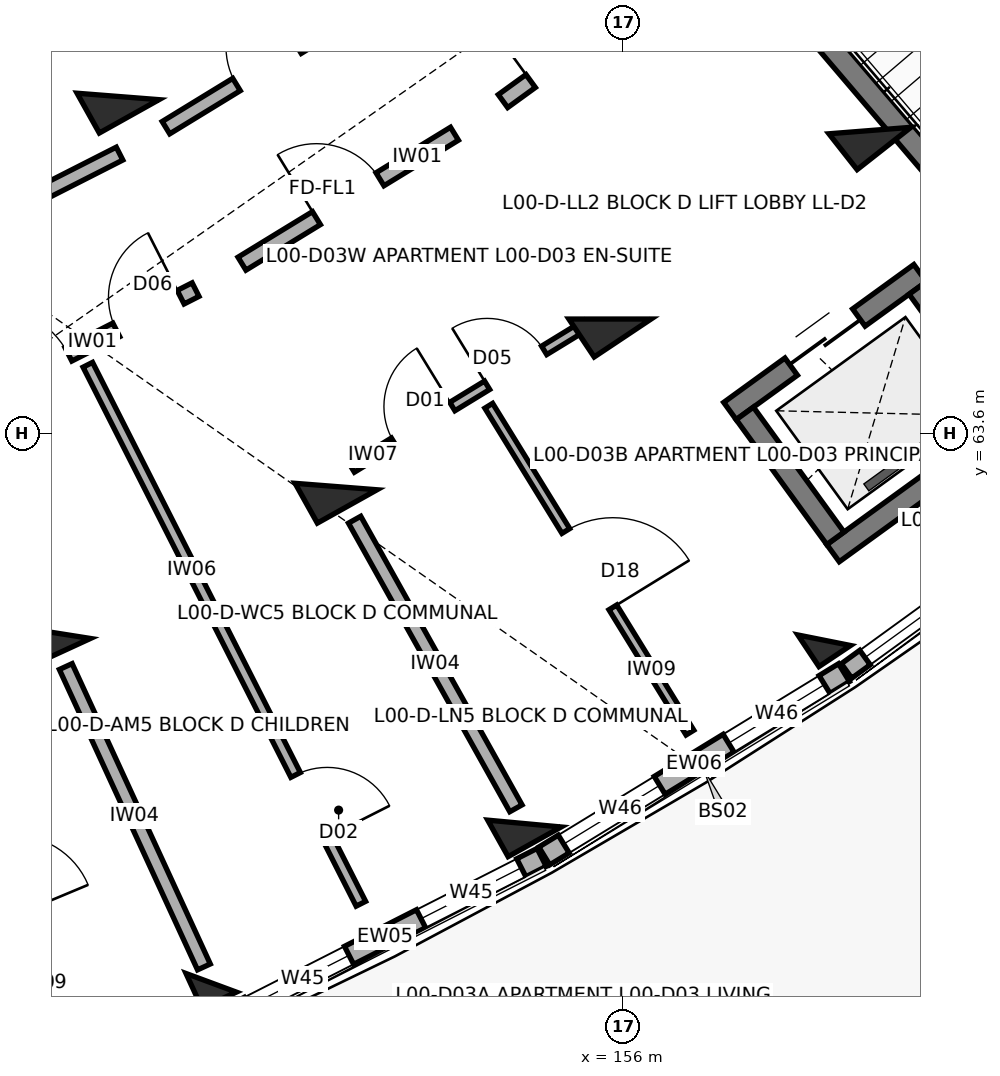
"""IFC4 building model, lengths in metres.
Left out: names, types, materials, properties, quantities, classifications, styles, units other than length and angle.
Written with IfcOpenShell. Run it as: python <this file> out.ifc"""

import sys

from ifc_helpers import new_model, si_unit, direction, frame, frame_2d, origin, origin_2d, place, context, subcontext, project, spatial, rectangle, extrude, element, fill, save


model = new_model("IFC4")
c1 = context("Model", 3, precision=1e-05, world=origin(), true_north=direction((0.0, 1.0)))
c2 = subcontext(c1, "Body", "Model", "MODEL_VIEW")
j1 = project(units=[si_unit("LENGTHUNIT", "METRE"), si_unit("PLANEANGLEUNIT", "RADIAN")], contexts=[c1])
p1 = place(None, origin())
s1 = spatial("IfcSite", under=j1, at=p1, CompositionType="ELEMENT")
p2 = place(p1, origin())
s2 = spatial("IfcBuilding", under=s1, at=p2, CompositionType="ELEMENT")
p3 = place(p2, origin())
s3 = spatial("IfcBuildingStorey", under=s2, at=p3, CompositionType="ELEMENT", Elevation=0.0)
p4 = place(p3, frame((148.461, 60.982, 0.0), z_axis=(0.0, 0.0, 1.0), x_axis=(0.417867073801, -0.908508177527, 0.0)))
e1 = element("IfcColumn", 1, at=p4, inside=s3, PredefinedType="COLUMN", context=c2, shape_type="SweptSolid", body=[
    extrude(rectangle(XDim=0.6, YDim=0.9, at=origin_2d()), origin(), (0.0, 0.0, 1.0), 4.5),
])
p5 = place(p3, frame((150.584, 56.367, 0.0), z_axis=(0.0, 0.0, 1.0), x_axis=(0.417867073801, -0.908508177527, 0.0)))
e2 = element("IfcColumn", 2, at=p5, inside=s3, PredefinedType="COLUMN", context=c2, shape_type="SweptSolid", body=[
    extrude(rectangle(XDim=0.5, YDim=0.5, at=origin_2d()), origin(), (0.0, 0.0, 1.0), 4.5),
])
for number, where, z_axis, x_axis in (
    (3, (149.358, 68.03, 0.0), (0.0, 0.0, 1.0), (0.488, -0.873, 0.0)),
    (4, (152.227, 62.897, 0.0), (0.0, 0.0, 1.0), (0.488, -0.873, 0.0)),
):
    element("IfcColumn", number, at=place(p3, frame(where, z_axis=z_axis, x_axis=x_axis)), inside=s3, PredefinedType="COLUMN", context=c2, shape_type="SweptSolid", body=[
        extrude(rectangle(XDim=0.6, YDim=0.9, at=origin_2d()), origin(), (0.0, 0.0, 1.0), 4.5),
    ])
p6 = place(p3, frame((154.705, 58.462, 0.0), z_axis=(0.0, 0.0, 1.0), x_axis=(0.487859659139, -0.87292207727, 0.0)))
e5 = element("IfcColumn", 5, at=p6, inside=s3, PredefinedType="COLUMN", context=c2, shape_type="SweptSolid", body=[
    extrude(rectangle(XDim=0.55, YDim=0.8, at=origin_2d()), origin(), (0.0, 0.0, 1.0), 4.5),
])
p7 = place(p3, frame((155.831, 65.101, 0.0), z_axis=(0.0, 0.0, 1.0), x_axis=(0.554844427448, -0.83195412213, 0.0)))
e6 = element("IfcColumn", 6, at=p7, inside=s3, PredefinedType="COLUMN", context=c2, shape_type="SweptSolid", body=[
    extrude(rectangle(XDim=0.6, YDim=0.9, at=origin_2d()), origin(), (0.0, 0.0, 1.0), 4.5),
])
p8 = place(p3, frame((158.649, 60.875, 0.0), z_axis=(0.0, 0.0, 1.0), x_axis=(0.554844427448, -0.83195412213, 0.0)))
e7 = element("IfcColumn", 7, at=p8, inside=s3, PredefinedType="COLUMN", context=c2, shape_type="SweptSolid", body=[
    extrude(rectangle(XDim=0.5, YDim=0.5, at=origin_2d()), origin(), (0.0, 0.0, 1.0), 4.5),
])
p9 = place(p3, frame((159.25, 67.581, 0.0), z_axis=(0.0, 0.0, 1.0), x_axis=(0.618408395358, -0.785856893175, 0.0)))
e8 = element("IfcColumn", 8, at=p9, inside=s3, PredefinedType="COLUMN", context=c2, shape_type="SweptSolid", body=[
    extrude(rectangle(XDim=0.6, YDim=0.9, at=origin_2d()), origin(), (0.0, 0.0, 1.0), 4.5),
])
p10 = place(p3, frame((150.811, 55.922, 0.0), z_axis=(0.0, 0.0, 1.0), x_axis=(0.891407190547, 0.453203288428, 0.0)))
e9 = element("IfcWall", 9, at=p10, inside=s3, PredefinedType="SOLIDWALL", context=c2, shape_type="SweptSolid", body=[
    extrude(rectangle(XDim=4.623, YDim=0.265, at=frame_2d((2.311, 0.0))), origin(), (0.0, 0.0, 1.0), 3.45),
])
p11 = place(p10, frame((0.3, 0.0, 0.3)))
e10 = element("IfcOpeningElement", 10, at=p11, cuts=e9, PredefinedType="OPENING", context=c2, shape_type="SweptSolid", body=[
    extrude(rectangle(XDim=1.48, YDim=1.16, at=frame_2d((0.74, 0.58))), frame((0.0, 0.142, 0.0), z_axis=(0.0, -1.0, 0.0), x_axis=(1.0, 0.0, 0.0)), (0.0, 0.0, 1.0), 0.285),
])
p12 = place(p10, frame((2.843, 0.0, 0.3)))
e11 = element("IfcOpeningElement", 11, at=p12, cuts=e9, PredefinedType="OPENING", context=c2, shape_type="SweptSolid", body=[
    extrude(rectangle(XDim=1.48, YDim=1.16, at=frame_2d((0.74, 0.58))), frame((0.0, 0.142, 0.0), z_axis=(0.0, -1.0, 0.0), x_axis=(1.0, 0.0, 0.0)), (0.0, 0.0, 1.0), 0.285),
])
p13 = place(p3, frame((154.966, 58.036, 0.0), z_axis=(0.0, 0.0, 1.0), x_axis=(0.853100316352, 0.521746921639, 0.0)))
e12 = element("IfcWall", 12, at=p13, inside=s3, PredefinedType="SOLIDWALL", context=c2, shape_type="SweptSolid", body=[
    extrude(rectangle(XDim=4.623, YDim=0.275, at=frame_2d((2.311, 0.0))), origin(), (0.0, 0.0, 1.0), 3.45),
])
p14 = place(p13, frame((0.3, 0.0, 0.3)))
e13 = element("IfcOpeningElement", 13, at=p14, cuts=e12, PredefinedType="OPENING", context=c2, shape_type="SweptSolid", body=[
    extrude(rectangle(XDim=1.48, YDim=1.28, at=frame_2d((0.74, 0.64))), frame((0.0, 0.147, 0.0), z_axis=(0.0, -1.0, 0.0), x_axis=(1.0, 0.0, 0.0)), (0.0, 0.0, 1.0), 0.295),
])
p15 = place(p13, frame((2.843, 0.0, 0.3)))
e14 = element("IfcOpeningElement", 14, at=p15, cuts=e12, PredefinedType="OPENING", context=c2, shape_type="SweptSolid", body=[
    extrude(rectangle(XDim=1.48, YDim=1.28, at=frame_2d((0.74, 0.64))), frame((0.0, 0.147, 0.0), z_axis=(0.0, -1.0, 0.0), x_axis=(1.0, 0.0, 0.0)), (0.0, 0.0, 1.0), 0.295),
])
p16 = place(p3, frame((158.943, 60.47, 0.0), z_axis=(0.0, 0.0, 1.0), x_axis=(0.809511918444, 0.58710344395, 0.0)))
e15 = element("IfcWall", 15, at=p16, inside=s3, PredefinedType="SOLIDWALL", context=c2, shape_type="SweptSolid", body=[
    extrude(rectangle(XDim=4.623, YDim=0.235, at=frame_2d((2.311, 0.0))), origin(), (0.0, 0.0, 1.0), 3.45),
])
p17 = place(p16, frame((0.3, 0.0, 0.3)))
e16 = element("IfcOpeningElement", 16, at=p17, cuts=e15, PredefinedType="OPENING", context=c2, shape_type="SweptSolid", body=[
    extrude(rectangle(XDim=1.48, YDim=1.42, at=frame_2d((0.74, 0.71))), frame((0.0, 0.127, 0.0), z_axis=(0.0, -1.0, 0.0), x_axis=(1.0, 0.0, 0.0)), (0.0, 0.0, 1.0), 0.255),
])
p18 = place(p16, frame((2.843, 0.0, 0.3)))
e17 = element("IfcOpeningElement", 17, at=p18, cuts=e15, PredefinedType="OPENING", context=c2, shape_type="SweptSolid", body=[
    extrude(rectangle(XDim=1.48, YDim=1.42, at=frame_2d((0.74, 0.71))), frame((0.0, 0.127, 0.0), z_axis=(0.0, -1.0, 0.0), x_axis=(1.0, 0.0, 0.0)), (0.0, 0.0, 1.0), 0.255),
])
p19 = place(p3, frame((157.583, 70.041, 0.0), z_axis=(0.0, 0.0, 1.0), x_axis=(0.648762810187, -0.760990680704, 0.0)))
e18 = element("IfcWall", 18, at=p19, inside=s3, PredefinedType="SHEAR", context=c2, shape_type="SweptSolid", body=[
    extrude(rectangle(XDim=7.69, YDim=0.3, at=frame_2d((3.845, 0.0))), origin(), (0.0, 0.0, 1.0), 4.5),
])
p20 = place(p3, frame((157.409, 63.89, 0.0), z_axis=(0.0, 0.0, 1.0), x_axis=(0.809510936031, 0.587104798521, 0.0)))
e19 = element("IfcWall", 19, at=p20, inside=s3, PredefinedType="SHEAR", context=c2, shape_type="SweptSolid", body=[
    extrude(rectangle(XDim=3.09, YDim=0.28, at=frame_2d((1.545, 0.0))), origin(), (0.0, 0.0, 1.0), 4.5),
])
p21 = place(p20, frame((0.995, 0.0, 0.0)))
e20 = element("IfcOpeningElement", 20, at=p21, cuts=e19, PredefinedType="OPENING", context=c2, shape_type="SweptSolid", body=[
    extrude(rectangle(XDim=1.1, YDim=2.15, at=frame_2d((0.55, 1.075))), frame((0.0, 0.15, 0.0), z_axis=(0.0, -1.0, 0.0), x_axis=(1.0, 0.0, 0.0)), (0.0, 0.0, 1.0), 0.3),
])
p22 = place(p3, frame((158.765, 62.021, 0.0), z_axis=(0.0, 0.0, 1.0), x_axis=(0.809548485838, 0.587053020669, 0.0)))
e21 = element("IfcWall", 21, at=p22, inside=s3, PredefinedType="SHEAR", context=c2, shape_type="SweptSolid", body=[
    extrude(rectangle(XDim=3.09, YDim=0.28, at=frame_2d((1.545, 0.0))), origin(), (0.0, 0.0, 1.0), 4.5),
])
p23 = place(p3, frame((157.604, 63.859, 0.0), z_axis=(0.0, 0.0, 1.0), x_axis=(0.587127188998, -0.809494696671, 0.0)))
e22 = element("IfcWall", 22, at=p23, inside=s3, PredefinedType="SHEAR", context=c2, shape_type="SweptSolid", body=[
    extrude(rectangle(XDim=2.03, YDim=0.28, at=frame_2d((1.015, 0.0))), origin(), (0.0, 0.0, 1.0), 4.5),
])
p24 = place(p3, frame((159.879, 65.509, 0.0), z_axis=(0.0, 0.0, 1.0), x_axis=(0.58704837408, -0.809551855344, 0.0)))
e23 = element("IfcWall", 23, at=p24, inside=s3, PredefinedType="SHEAR", context=c2, shape_type="SweptSolid", body=[
    extrude(rectangle(XDim=2.03, YDim=0.28, at=frame_2d((1.015, 0.0))), origin(), (0.0, 0.0, 1.0), 4.5),
])
p25 = place(p3, frame((146.837, 59.996, 0.0), z_axis=(0.0, 0.0, 1.0), x_axis=(0.385846225752, -0.922563108992, 0.0)))
e24 = element("IfcWall", 24, at=p25, inside=s3, PredefinedType="PARTITIONING", context=c2, shape_type="SweptSolid", body=[
    extrude(rectangle(XDim=4.9, YDim=0.12, at=frame_2d((2.45, 0.0))), origin(), (0.0, 0.0, 1.0), 3.34),
])
p26 = place(p25, frame((1.92, 0.0, 0.0)))
e25 = element("IfcOpeningElement", 25, at=p26, cuts=e24, PredefinedType="OPENING", context=c2, shape_type="SweptSolid", body=[
    extrude(rectangle(XDim=1.06, YDim=2.1, at=frame_2d((0.53, 1.05))), frame((0.0, 0.07, 0.0), z_axis=(0.0, -1.0, 0.0), x_axis=(1.0, 0.0, 0.0)), (0.0, 0.0, 1.0), 0.14),
])
p27 = place(p3, frame((147.457, 64.003, 0.0), z_axis=(0.0, 0.0, 1.0), x_axis=(0.891412167565, 0.45319349898, 0.0)))
e26 = element("IfcWall", 26, at=p27, inside=s3, PredefinedType="SOLIDWALL", context=c2, shape_type="SweptSolid", body=[
    extrude(rectangle(XDim=3.277, YDim=0.2, at=frame_2d((1.639, 0.0))), origin(), (0.0, 0.0, 1.0), 3.34),
])
p28 = place(p27, frame((0.28, 0.0, 0.0)))
e27 = element("IfcOpeningElement", 27, at=p28, cuts=e26, PredefinedType="OPENING", context=c2, shape_type="SweptSolid", body=[
    extrude(rectangle(XDim=1.12, YDim=2.15, at=frame_2d((0.56, 1.075))), frame((0.0, 0.11, 0.0), z_axis=(0.0, -1.0, 0.0), x_axis=(1.0, 0.0, 0.0)), (0.0, 0.0, 1.0), 0.22),
])
p29 = place(p27, frame((2.107, 0.0, 0.0)))
e28 = element("IfcOpeningElement", 28, at=p29, cuts=e26, PredefinedType="OPENING", context=c2, shape_type="SweptSolid", body=[
    extrude(rectangle(XDim=0.95, YDim=2.1, at=frame_2d((0.475, 1.05))), frame((0.0, 0.11, 0.0), z_axis=(0.0, -1.0, 0.0), x_axis=(1.0, 0.0, 0.0)), (0.0, 0.0, 1.0), 0.22),
])
p30 = place(p3, frame((146.6, 65.865, 0.0), z_axis=(0.0, 0.0, 1.0), x_axis=(0.891414101388, 0.453189695212, 0.0)))
e29 = element("IfcWall", 29, at=p30, inside=s3, PredefinedType="SOLIDWALL", context=c2, shape_type="SweptSolid", body=[
    extrude(rectangle(XDim=3.116, YDim=0.19, at=frame_2d((1.558, 0.0))), origin(), (0.0, 0.0, 1.0), 3.34),
])
p31 = place(p30, frame((1.098, 0.0, 0.0)))
e30 = element("IfcOpeningElement", 30, at=p31, cuts=e29, PredefinedType="OPENING", context=c2, shape_type="SweptSolid", body=[
    extrude(rectangle(XDim=0.92, YDim=2.1, at=frame_2d((0.46, 1.05))), frame((0.0, 0.105, 0.0), z_axis=(0.0, -1.0, 0.0), x_axis=(1.0, 0.0, 0.0)), (0.0, 0.0, 1.0), 0.21),
])
p32 = place(p3, frame((148.96, 64.499, 0.0), z_axis=(0.0, 0.0, 1.0), x_axis=(0.451912010816, -0.892062517137, 0.0)))
e31 = element("IfcWall", 31, at=p32, inside=s3, PredefinedType="PARTITIONING", context=c2, shape_type="SweptSolid", body=[
    extrude(rectangle(XDim=7.95, YDim=0.14, at=frame_2d((3.975, 0.0))), origin(), (0.0, 0.0, 1.0), 3.34),
])
p33 = place(p32, frame((6.05, 0.0, 0.0)))
e32 = element("IfcOpeningElement", 32, at=p33, cuts=e31, PredefinedType="OPENING", context=c2, shape_type="SweptSolid", body=[
    extrude(rectangle(XDim=0.92, YDim=2.1, at=frame_2d((0.46, 1.05))), frame((0.0, 0.08, 0.0), z_axis=(0.0, -1.0, 0.0), x_axis=(1.0, 0.0, 0.0)), (0.0, 0.0, 1.0), 0.16),
])
p34 = place(p3, frame((148.67, 60.528, 0.0), z_axis=(0.0, 0.0, 1.0), x_axis=(0.417837051164, -0.908521985796, 0.0)))
e33 = element("IfcWall", 33, at=p34, inside=s3, PredefinedType="SOLIDWALL", context=c2, shape_type="SweptSolid", body=[
    extrude(rectangle(XDim=4.35, YDim=0.185, at=frame_2d((2.175, 0.0))), origin(), (0.0, 0.0, 1.0), 3.34),
])
p35 = place(p3, frame((150.989, 65.829, 0.0), z_axis=(0.0, 0.0, 1.0), x_axis=(0.853090237845, 0.521763400492, 0.0)))
e34 = element("IfcWall", 34, at=p35, inside=s3, PredefinedType="SOLIDWALL", context=c2, shape_type="SweptSolid", body=[
    extrude(rectangle(XDim=3.277, YDim=0.2, at=frame_2d((1.638, 0.0))), origin(), (0.0, 0.0, 1.0), 3.34),
])
p36 = place(p35, frame((1.148, 0.0, 0.0)))
e35 = element("IfcOpeningElement", 35, at=p36, cuts=e34, PredefinedType="OPENING", context=c2, shape_type="SweptSolid", body=[
    extrude(rectangle(XDim=0.98, YDim=2.15, at=frame_2d((0.49, 1.075))), frame((0.0, 0.11, 0.0), z_axis=(0.0, -1.0, 0.0), x_axis=(1.0, 0.0, 0.0)), (0.0, 0.0, 1.0), 0.22),
])
p37 = place(p3, frame((149.989, 67.619, 0.0), z_axis=(0.0, 0.0, 1.0), x_axis=(0.853121049608, 0.5217130195, 0.0)))
e36 = element("IfcWall", 36, at=p37, inside=s3, PredefinedType="SOLIDWALL", context=c2, shape_type="SweptSolid", body=[
    extrude(rectangle(XDim=3.116, YDim=0.19, at=frame_2d((1.558, 0.0))), origin(), (0.0, 0.0, 1.0), 3.34),
])
p38 = place(p37, frame((1.088, 0.0, 0.0)))
e37 = element("IfcOpeningElement", 37, at=p38, cuts=e36, PredefinedType="OPENING", context=c2, shape_type="SweptSolid", body=[
    extrude(rectangle(XDim=0.94, YDim=2.1, at=frame_2d((0.47, 1.05))), frame((0.0, 0.105, 0.0), z_axis=(0.0, -1.0, 0.0), x_axis=(1.0, 0.0, 0.0)), (0.0, 0.0, 1.0), 0.21),
])
p39 = place(p3, frame((152.434, 63.141, 0.0), z_axis=(0.0, 0.0, 1.0), x_axis=(0.853089873067, 0.521763996909, 0.0)))
e38 = element("IfcWall", 38, at=p39, inside=s3, PredefinedType="PARTITIONING", context=c2, shape_type="SweptSolid", body=[
    extrude(rectangle(XDim=3.616, YDim=0.13, at=frame_2d((1.808, 0.0))), origin(), (0.0, 0.0, 1.0), 3.34),
])
p40 = place(p39, frame((0.65, 0.0, 0.0)))
e39 = element("IfcOpeningElement", 39, at=p40, cuts=e38, PredefinedType="OPENING", context=c2, shape_type="SweptSolid", body=[
    extrude(rectangle(XDim=0.9, YDim=2.1, at=frame_2d((0.45, 1.05))), frame((0.0, 0.075, 0.0), z_axis=(0.0, -1.0, 0.0), x_axis=(1.0, 0.0, 0.0)), (0.0, 0.0, 1.0), 0.15),
])
p41 = place(p39, frame((2.086, 0.0, 0.0)))
e40 = element("IfcOpeningElement", 40, at=p41, cuts=e38, PredefinedType="OPENING", context=c2, shape_type="SweptSolid", body=[
    extrude(rectangle(XDim=0.88, YDim=2.1, at=frame_2d((0.44, 1.05))), frame((0.0, 0.075, 0.0), z_axis=(0.0, -1.0, 0.0), x_axis=(1.0, 0.0, 0.0)), (0.0, 0.0, 1.0), 0.15),
])
p42 = place(p3, frame((154.235, 63.96, 0.0), z_axis=(0.0, 0.0, 1.0), x_axis=(0.524202618281, -0.851593573829, 0.0)))
e41 = element("IfcWall", 41, at=p42, inside=s3, PredefinedType="PARTITIONING", context=c2, shape_type="SweptSolid", body=[
    extrude(rectangle(XDim=5.05, YDim=0.12, at=frame_2d((2.525, 0.0))), origin(), (0.0, 0.0, 1.0), 3.34),
])
p43 = place(p42, frame((1.935, 0.0, 0.0)))
e42 = element("IfcOpeningElement", 42, at=p43, cuts=e41, PredefinedType="OPENING", context=c2, shape_type="SweptSolid", body=[
    extrude(rectangle(XDim=1.18, YDim=2.1, at=frame_2d((0.59, 1.05))), frame((0.0, 0.07, 0.0), z_axis=(0.0, -1.0, 0.0), x_axis=(1.0, 0.0, 0.0)), (0.0, 0.0, 1.0), 0.14),
])
p44 = place(p3, frame((152.471, 62.46, 0.0), z_axis=(0.0, 0.0, 1.0), x_axis=(0.487866639184, -0.872918176218, 0.0)))
e43 = element("IfcWall", 43, at=p44, inside=s3, PredefinedType="SOLIDWALL", context=c2, shape_type="SweptSolid", body=[
    extrude(rectangle(XDim=4.35, YDim=0.185, at=frame_2d((2.175, 0.0))), origin(), (0.0, 0.0, 1.0), 3.34),
])
p45 = place(p3, frame((154.423, 67.968, 0.0), z_axis=(0.0, 0.0, 1.0), x_axis=(0.809516127005, 0.587097641043, 0.0)))
e44 = element("IfcWall", 44, at=p45, inside=s3, PredefinedType="SOLIDWALL", context=c2, shape_type="SweptSolid", body=[
    extrude(rectangle(XDim=3.137, YDim=0.21, at=frame_2d((1.569, 0.0))), origin(), (0.0, 0.0, 1.0), 3.34),
])
p46 = place(p45, frame((0.45, 0.0, 0.0)))
e45 = element("IfcOpeningElement", 45, at=p46, cuts=e44, PredefinedType="OPENING", context=c2, shape_type="SweptSolid", body=[
    extrude(rectangle(XDim=1.1, YDim=2.15, at=frame_2d((0.55, 1.075))), frame((0.0, 0.115, 0.0), z_axis=(0.0, -1.0, 0.0), x_axis=(1.0, 0.0, 0.0)), (0.0, 0.0, 1.0), 0.23),
])
p47 = place(p45, frame((1.567, 0.0, 0.0)))
e46 = element("IfcOpeningElement", 46, at=p47, cuts=e44, PredefinedType="OPENING", context=c2, shape_type="SweptSolid", body=[
    extrude(rectangle(XDim=1.12, YDim=2.15, at=frame_2d((0.56, 1.075))), frame((0.0, 0.115, 0.0), z_axis=(0.0, -1.0, 0.0), x_axis=(1.0, 0.0, 0.0)), (0.0, 0.0, 1.0), 0.23),
])
p48 = place(p11, origin())
e47 = element("IfcWindow", 47, at=p48, inside=s3, PartitioningType="DOUBLE_PANEL_VERTICAL", PredefinedType="WINDOW", context=c2, shape_type="SweptSolid", body=[
    extrude(rectangle(XDim=1.48, YDim=1.16, at=frame_2d((0.74, 0.58))), frame((0.0, 0.03, 0.0), z_axis=(0.0, -1.0, 0.0), x_axis=(1.0, 0.0, 0.0)), (0.0, 0.0, 1.0), 0.06),
])
fill(e10, e47)
p49 = place(p12, origin())
e48 = element("IfcWindow", 48, at=p49, inside=s3, PartitioningType="DOUBLE_PANEL_VERTICAL", PredefinedType="WINDOW", context=c2, shape_type="SweptSolid", body=[
    extrude(rectangle(XDim=1.48, YDim=1.16, at=frame_2d((0.74, 0.58))), frame((0.0, 0.03, 0.0), z_axis=(0.0, -1.0, 0.0), x_axis=(1.0, 0.0, 0.0)), (0.0, 0.0, 1.0), 0.06),
])
fill(e11, e48)
p50 = place(p14, origin())
e49 = element("IfcWindow", 49, at=p50, inside=s3, PartitioningType="DOUBLE_PANEL_VERTICAL", PredefinedType="WINDOW", context=c2, shape_type="SweptSolid", body=[
    extrude(rectangle(XDim=1.48, YDim=1.28, at=frame_2d((0.74, 0.64))), frame((0.0, 0.03, 0.0), z_axis=(0.0, -1.0, 0.0), x_axis=(1.0, 0.0, 0.0)), (0.0, 0.0, 1.0), 0.06),
])
fill(e13, e49)
p51 = place(p15, origin())
e50 = element("IfcWindow", 50, at=p51, inside=s3, PartitioningType="DOUBLE_PANEL_VERTICAL", PredefinedType="WINDOW", context=c2, shape_type="SweptSolid", body=[
    extrude(rectangle(XDim=1.48, YDim=1.28, at=frame_2d((0.74, 0.64))), frame((0.0, 0.03, 0.0), z_axis=(0.0, -1.0, 0.0), x_axis=(1.0, 0.0, 0.0)), (0.0, 0.0, 1.0), 0.06),
])
fill(e14, e50)
p52 = place(p17, origin())
e51 = element("IfcWindow", 51, at=p52, inside=s3, PartitioningType="DOUBLE_PANEL_VERTICAL", PredefinedType="WINDOW", context=c2, shape_type="SweptSolid", body=[
    extrude(rectangle(XDim=1.48, YDim=1.42, at=frame_2d((0.74, 0.71))), frame((0.0, 0.03, 0.0), z_axis=(0.0, -1.0, 0.0), x_axis=(1.0, 0.0, 0.0)), (0.0, 0.0, 1.0), 0.06),
])
fill(e16, e51)
p53 = place(p21, origin())
e52 = element("IfcDoor", 52, at=p53, inside=s3, OperationType="DOUBLE_DOOR_SLIDING", PredefinedType="DOOR", context=c2, shape_type="SweptSolid", body=[
    extrude(rectangle(XDim=1.1, YDim=2.15, at=frame_2d((0.55, 1.075))), frame((0.0, 0.025, 0.0), z_axis=(0.0, -1.0, 0.0), x_axis=(1.0, 0.0, 0.0)), (0.0, 0.0, 1.0), 0.05),
])
fill(e20, e52)
p54 = place(p28, origin())
e53 = element("IfcDoor", 53, at=p54, inside=s3, OperationType="SINGLE_SWING_LEFT", PredefinedType="DOOR", context=c2, shape_type="SweptSolid", body=[
    extrude(rectangle(XDim=1.12, YDim=2.15, at=frame_2d((0.56, 1.075))), frame((0.0, 0.025, 0.0), z_axis=(0.0, -1.0, 0.0), x_axis=(1.0, 0.0, 0.0)), (0.0, 0.0, 1.0), 0.05),
])
fill(e27, e53)
p55 = place(p29, origin())
e54 = element("IfcDoor", 54, at=p55, inside=s3, OperationType="SINGLE_SWING_RIGHT", PredefinedType="DOOR", context=c2, shape_type="SweptSolid", body=[
    extrude(rectangle(XDim=0.95, YDim=2.1, at=frame_2d((0.475, 1.05))), frame((0.0, 0.025, 0.0), z_axis=(0.0, -1.0, 0.0), x_axis=(1.0, 0.0, 0.0)), (0.0, 0.0, 1.0), 0.05),
])
fill(e28, e54)
p56 = place(p33, origin())
e55 = element("IfcDoor", 55, at=p56, inside=s3, OperationType="SINGLE_SWING_RIGHT", PredefinedType="DOOR", context=c2, shape_type="SweptSolid", body=[
    extrude(rectangle(XDim=0.92, YDim=2.1, at=frame_2d((0.46, 1.05))), frame((0.0, 0.025, 0.0), z_axis=(0.0, -1.0, 0.0), x_axis=(1.0, 0.0, 0.0)), (0.0, 0.0, 1.0), 0.05),
])
fill(e32, e55)
p57 = place(p36, origin())
e56 = element("IfcDoor", 56, at=p57, inside=s3, OperationType="SINGLE_SWING_LEFT", PredefinedType="DOOR", context=c2, shape_type="SweptSolid", body=[
    extrude(rectangle(XDim=0.98, YDim=2.15, at=frame_2d((0.49, 1.075))), frame((0.0, 0.025, 0.0), z_axis=(0.0, -1.0, 0.0), x_axis=(1.0, 0.0, 0.0)), (0.0, 0.0, 1.0), 0.05),
])
fill(e35, e56)
p58 = place(p38, origin())
e57 = element("IfcDoor", 57, at=p58, inside=s3, OperationType="SINGLE_SWING_RIGHT", PredefinedType="DOOR", context=c2, shape_type="SweptSolid", body=[
    extrude(rectangle(XDim=0.94, YDim=2.1, at=frame_2d((0.47, 1.05))), frame((0.0, 0.025, 0.0), z_axis=(0.0, -1.0, 0.0), x_axis=(1.0, 0.0, 0.0)), (0.0, 0.0, 1.0), 0.05),
])
fill(e37, e57)
p59 = place(p40, origin())
e58 = element("IfcDoor", 58, at=p59, inside=s3, OperationType="SINGLE_SWING_RIGHT", PredefinedType="DOOR", context=c2, shape_type="SweptSolid", body=[
    extrude(rectangle(XDim=0.9, YDim=2.1, at=frame_2d((0.45, 1.05))), frame((0.0, 0.025, 0.0), z_axis=(0.0, -1.0, 0.0), x_axis=(1.0, 0.0, 0.0)), (0.0, 0.0, 1.0), 0.05),
])
fill(e39, e58)
p60 = place(p41, origin())
e59 = element("IfcDoor", 59, at=p60, inside=s3, OperationType="SINGLE_SWING_LEFT", PredefinedType="DOOR", context=c2, shape_type="SweptSolid", body=[
    extrude(rectangle(XDim=0.88, YDim=2.1, at=frame_2d((0.44, 1.05))), frame((0.0, 0.025, 0.0), z_axis=(0.0, -1.0, 0.0), x_axis=(1.0, 0.0, 0.0)), (0.0, 0.0, 1.0), 0.05),
])
fill(e40, e59)
p61 = place(p43, origin())
e60 = element("IfcDoor", 60, at=p61, inside=s3, OperationType="SINGLE_SWING_RIGHT", PredefinedType="DOOR", context=c2, shape_type="SweptSolid", body=[
    extrude(rectangle(XDim=1.18, YDim=2.1, at=frame_2d((0.59, 1.05))), frame((0.0, 0.025, 0.0), z_axis=(0.0, -1.0, 0.0), x_axis=(1.0, 0.0, 0.0)), (0.0, 0.0, 1.0), 0.05),
])
fill(e42, e60)
p62 = place(p46, origin())
e61 = element("IfcDoor", 61, at=p62, inside=s3, OperationType="SINGLE_SWING_LEFT", PredefinedType="DOOR", context=c2, shape_type="SweptSolid", body=[
    extrude(rectangle(XDim=1.1, YDim=2.15, at=frame_2d((0.55, 1.075))), frame((0.0, 0.025, 0.0), z_axis=(0.0, -1.0, 0.0), x_axis=(1.0, 0.0, 0.0)), (0.0, 0.0, 1.0), 0.05),
])
fill(e45, e61)
save(model, sys.argv[1])
